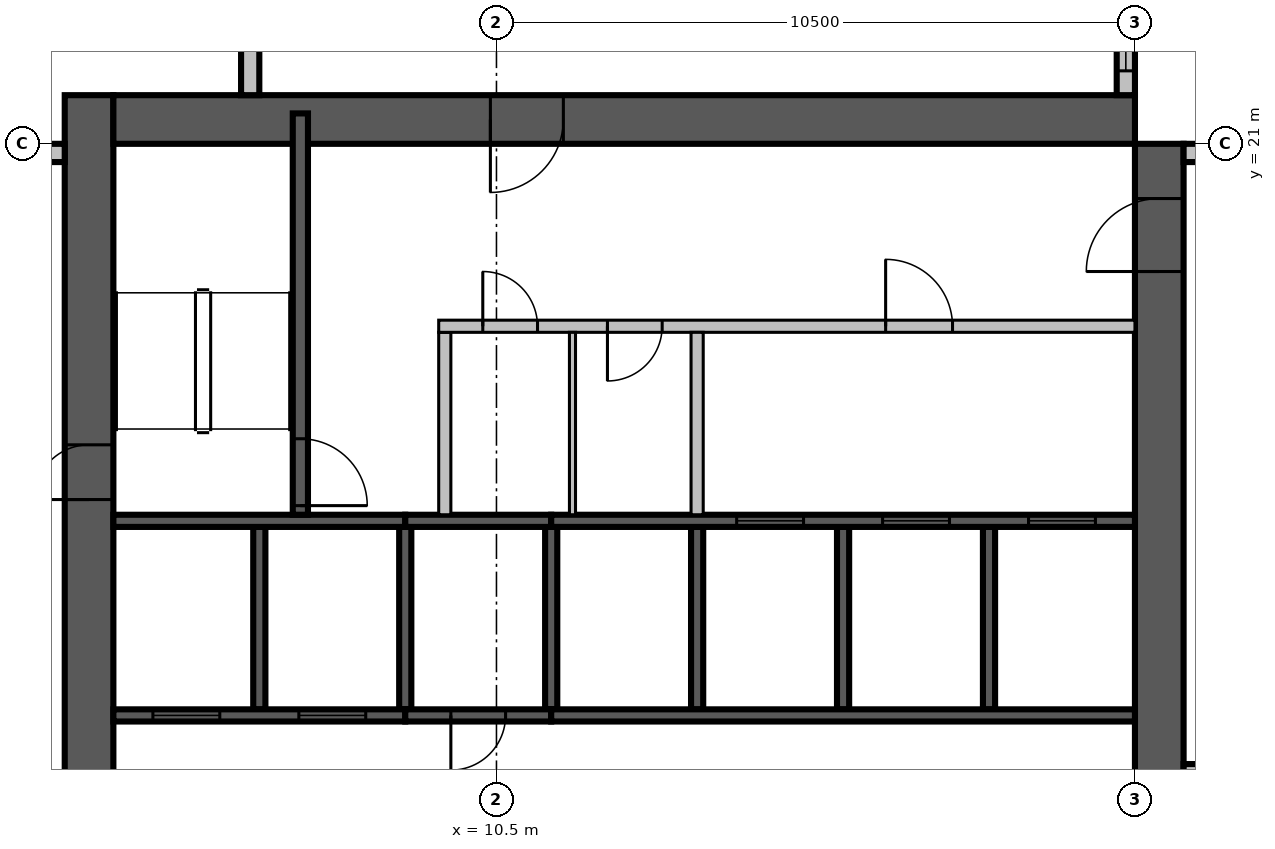
"""IFC4 building model, lengths in metres.
Left out: names, types, materials, properties, quantities, classifications, styles, units other than length and angle.
Written with IfcOpenShell. Run it as: python <this file> out.ifc"""

import sys

from ifc_helpers import new_model, si_unit, direction, frame, frame_2d, origin, place, context, subcontext, project, spatial, rectangle, extrude, source, transform, mapped, element, fill, save


model = new_model("IFC4")
c1 = context("Model", 3, precision=1e-05, world=origin(), true_north=direction((0.0, 1.0)))
c2 = subcontext(c1, "Body", "Model", "MODEL_VIEW")
j1 = project(units=[si_unit("LENGTHUNIT", "METRE"), si_unit("PLANEANGLEUNIT", "RADIAN")], contexts=[c1])
p1 = place(None, origin())
s1 = spatial("IfcSite", under=j1, at=p1, CompositionType="ELEMENT")
p2 = place(p1, origin())
s2 = spatial("IfcBuilding", under=s1, at=p2, CompositionType="ELEMENT")
p3 = place(p2, frame((0.0, 0.0, 257.6)))
s3 = spatial("IfcBuildingStorey", under=s2, at=p3, CompositionType="ELEMENT", Elevation=257.6)
m1 = source(origin(), c2, "Body", "SweptSolid", [
    extrude(rectangle(XDim=17.6, YDim=0.8, at=frame_2d((8.8, 0.0))), origin(), (0.0, 0.0, 1.0), 3.8),
])
p4 = place(p3, frame((3.8, 4.2, 0.0), z_axis=(0.0, 0.0, 1.0), x_axis=(0.0, 1.0, 0.0)))
e1 = element("IfcWall", 1, at=p4, inside=s3, PredefinedType="SHEAR", context=c2, shape_type="MappedRepresentation", body=[
    mapped(m1, transform((0.0, 0.0, 0.0), scale=1.0)),
])
m2 = source(origin(), c2, "Body", "SweptSolid", [
    extrude(rectangle(XDim=2.2, YDim=2.1, at=frame_2d((1.1, 1.05))), frame((0.0, 0.41, 0.0), z_axis=(0.0, -1.0, 0.0), x_axis=(1.0, 0.0, 0.0)), (0.0, 0.0, 1.0), 0.82),
])
p5 = place(p4, frame((4.2, 0.0, 0.0)))
e2 = element("IfcOpeningElement", 2, at=p5, cuts=e1, PredefinedType="OPENING", context=c2, shape_type="MappedRepresentation", body=[
    mapped(m2, transform((0.0, 0.0, 0.0), scale=1.0)),
])
m3 = source(origin(), c2, "Body", "SweptSolid", [
    extrude(rectangle(XDim=0.9, YDim=2.1, at=frame_2d((0.45, 1.05))), frame((0.0, 0.41, 0.0), z_axis=(0.0, -1.0, 0.0), x_axis=(1.0, 0.0, 0.0)), (0.0, 0.0, 1.0), 0.82),
])
p6 = place(p4, frame((10.95, 0.0, 0.0)))
e3 = element("IfcOpeningElement", 3, at=p6, cuts=e1, PredefinedType="OPENING", context=c2, shape_type="MappedRepresentation", body=[
    mapped(m3, transform((0.0, 0.0, 0.0), scale=1.0)),
])
m4 = source(origin(), c2, "Body", "SweptSolid", [
    extrude(rectangle(XDim=16.8, YDim=0.8, at=frame_2d((8.4, 0.0))), origin(), (0.0, 0.0, 1.0), 3.8),
])
p7 = place(p3, frame((21.4, 4.2, 0.0), z_axis=(0.0, 0.0, 1.0), x_axis=(0.0, 1.0, 0.0)))
e4 = element("IfcWall", 4, at=p7, inside=s3, PredefinedType="SHEAR", context=c2, shape_type="MappedRepresentation", body=[
    mapped(m4, transform((0.0, 0.0, 0.0), scale=1.0)),
])
m5 = source(origin(), c2, "Body", "SweptSolid", [
    extrude(rectangle(XDim=1.2, YDim=2.1, at=frame_2d((0.6, 1.05))), frame((0.0, 0.41, 0.0), z_axis=(0.0, -1.0, 0.0), x_axis=(1.0, 0.0, 0.0)), (0.0, 0.0, 1.0), 0.82),
])
p8 = place(p7, frame((14.7, 0.0, 0.0)))
e5 = element("IfcOpeningElement", 5, at=p8, cuts=e4, PredefinedType="OPENING", context=c2, shape_type="MappedRepresentation", body=[
    mapped(m5, transform((0.0, 0.0, 0.0), scale=1.0)),
])
p9 = place(p3, frame((4.2, 21.4, 0.0), z_axis=(0.0, 0.0, 1.0), x_axis=(1.0, 0.0, 0.0)))
e6 = element("IfcWall", 6, at=p9, inside=s3, PredefinedType="SHEAR", context=c2, shape_type="MappedRepresentation", body=[
    mapped(m4, transform((0.0, 0.0, 0.0), scale=1.0)),
])
p10 = place(p9, frame((6.2, 0.0, 0.0)))
e7 = element("IfcOpeningElement", 7, at=p10, cuts=e6, PredefinedType="OPENING", context=c2, shape_type="MappedRepresentation", body=[
    mapped(m5, transform((0.0, 0.0, 0.0), scale=1.0)),
])
m6 = source(origin(), c2, "Body", "SweptSolid", [
    extrude(rectangle(XDim=7.2, YDim=0.3, at=frame_2d((3.6, 0.0))), origin(), (0.0, 0.0, 1.0), 3.4),
])
p11 = place(p3, frame((21.8, 10.65, 0.0), z_axis=(0.0, 0.0, 1.0), x_axis=(1.0, 0.0, 0.0)))
e8 = element("IfcWall", 8, at=p11, inside=s3, PredefinedType="STANDARD", context=c2, shape_type="MappedRepresentation", body=[
    mapped(m6, transform((0.0, 0.0, 0.0), scale=1.0)),
])
m7 = source(origin(), c2, "Body", "SweptSolid", [
    extrude(rectangle(XDim=1.8, YDim=2.3, at=frame_2d((0.9, 1.15))), frame((0.0, 0.16, 0.0), z_axis=(0.0, -1.0, 0.0), x_axis=(1.0, 0.0, 0.0)), (0.0, 0.0, 1.0), 0.32),
])
p12 = place(p11, frame((0.4, 0.0, 0.6)))
e9 = element("IfcOpeningElement", 9, at=p12, cuts=e8, PredefinedType="OPENING", context=c2, shape_type="MappedRepresentation", body=[
    mapped(m7, transform((0.0, 0.0, 0.0), scale=1.0)),
])
p13 = place(p11, frame((4.787, 0.0, 0.6)))
e10 = element("IfcOpeningElement", 10, at=p13, cuts=e8, PredefinedType="OPENING", context=c2, shape_type="MappedRepresentation", body=[
    mapped(m7, transform((0.0, 0.0, 0.0), scale=1.0)),
])
p14 = place(p3, frame((29.0, 20.85, 0.0), z_axis=(0.0, 0.0, 1.0), x_axis=(-1.0, 0.0, 0.0)))
e11 = element("IfcWall", 11, at=p14, inside=s3, PredefinedType="STANDARD", context=c2, shape_type="MappedRepresentation", body=[
    mapped(m6, transform((0.0, 0.0, 0.0), scale=1.0)),
])
p15 = place(p14, frame((0.613, 0.0, 0.6)))
e12 = element("IfcOpeningElement", 12, at=p15, cuts=e11, PredefinedType="OPENING", context=c2, shape_type="MappedRepresentation", body=[
    mapped(m7, transform((0.0, 0.0, 0.0), scale=1.0)),
])
p16 = place(p14, frame((5.0, 0.0, 0.6)))
e13 = element("IfcOpeningElement", 13, at=p16, cuts=e11, PredefinedType="OPENING", context=c2, shape_type="MappedRepresentation", body=[
    mapped(m7, transform((0.0, 0.0, 0.0), scale=1.0)),
])
p17 = place(p3, frame((20.85, 21.8, 0.0), z_axis=(0.0, 0.0, 1.0), x_axis=(0.0, 1.0, 0.0)))
e14 = element("IfcWall", 14, at=p17, inside=s3, PredefinedType="STANDARD", context=c2, shape_type="MappedRepresentation", body=[
    mapped(m6, transform((0.0, 0.0, 0.0), scale=1.0)),
])
p18 = place(p17, frame((0.4, 0.0, 0.6)))
e15 = element("IfcOpeningElement", 15, at=p18, cuts=e14, PredefinedType="OPENING", context=c2, shape_type="MappedRepresentation", body=[
    mapped(m7, transform((0.0, 0.0, 0.0), scale=1.0)),
])
m8 = source(origin(), c2, "Body", "SweptSolid", [
    extrude(rectangle(XDim=1.0, YDim=2.1, at=frame_2d((0.5, 1.05))), frame((0.0, 0.16, 0.0), z_axis=(0.0, -1.0, 0.0), x_axis=(1.0, 0.0, 0.0)), (0.0, 0.0, 1.0), 0.32),
])
p19 = place(p17, frame((5.292, 0.0, 0.0)))
e16 = element("IfcOpeningElement", 16, at=p19, cuts=e14, PredefinedType="OPENING", context=c2, shape_type="MappedRepresentation", body=[
    mapped(m8, transform((0.0, 0.0, 0.0), scale=1.0)),
])
m9 = source(origin(), c2, "Body", "SweptSolid", [
    extrude(rectangle(XDim=16.6, YDim=0.3, at=frame_2d((8.3, 0.0))), origin(), (0.0, 0.0, 1.0), 3.4),
])
p20 = place(p3, frame((6.45, 38.4, 0.0), z_axis=(0.0, 0.0, 1.0), x_axis=(0.0, -1.0, 0.0)))
e17 = element("IfcWall", 17, at=p20, inside=s3, PredefinedType="STANDARD", context=c2, shape_type="MappedRepresentation", body=[
    mapped(m9, transform((0.0, 0.0, 0.0), scale=1.0)),
])
p21 = place(p20, frame((1.15, 0.0, 0.6)))
e18 = element("IfcOpeningElement", 18, at=p21, cuts=e17, PredefinedType="OPENING", context=c2, shape_type="MappedRepresentation", body=[
    mapped(m7, transform((0.0, 0.0, 0.0), scale=1.0)),
])
p22 = place(p20, frame((9.438, 0.0, 0.6)))
e19 = element("IfcOpeningElement", 19, at=p22, cuts=e17, PredefinedType="OPENING", context=c2, shape_type="MappedRepresentation", body=[
    mapped(m7, transform((0.0, 0.0, 0.0), scale=1.0)),
])
m10 = source(origin(), c2, "Body", "SweptSolid", [
    extrude(rectangle(XDim=3.0, YDim=2.3, at=frame_2d((1.5, 1.15))), frame((0.0, 0.16, 0.0), z_axis=(0.0, -1.0, 0.0), x_axis=(1.0, 0.0, 0.0)), (0.0, 0.0, 1.0), 0.32),
])
p23 = place(p20, frame((12.7, 0.0, 0.6)))
e20 = element("IfcOpeningElement", 20, at=p23, cuts=e17, PredefinedType="OPENING", context=c2, shape_type="MappedRepresentation", body=[
    mapped(m10, transform((0.0, 0.0, 0.0), scale=1.0)),
])
p24 = place(p20, frame((5.45, 0.0, 0.0)))
e21 = element("IfcOpeningElement", 21, at=p24, cuts=e17, PredefinedType="OPENING", context=c2, shape_type="MappedRepresentation", body=[
    mapped(m8, transform((0.0, 0.0, 0.0), scale=1.0)),
])
m11 = source(origin(), c2, "Body", "SweptSolid", [
    extrude(rectangle(XDim=2.6, YDim=0.3, at=frame_2d((1.3, 0.0))), origin(), (0.0, 0.0, 1.0), 3.4),
])
p25 = place(p3, frame((3.4, 20.85, 0.0), z_axis=(0.0, 0.0, 1.0), x_axis=(-1.0, 0.0, 0.0)))
e22 = element("IfcWall", 22, at=p25, inside=s3, PredefinedType="STANDARD", context=c2, shape_type="MappedRepresentation", body=[
    mapped(m11, transform((0.0, 0.0, 0.0), scale=1.0)),
])
p26 = place(p25, frame((0.4, 0.0, 0.6)))
e23 = element("IfcOpeningElement", 23, at=p26, cuts=e22, PredefinedType="OPENING", context=c2, shape_type="MappedRepresentation", body=[
    mapped(m7, transform((0.0, 0.0, 0.0), scale=1.0)),
])
m12 = source(origin(), c2, "Body", "SweptSolid", [
    extrude(rectangle(XDim=3.0, YDim=0.2, at=frame_2d((1.5, 0.0))), origin(), (0.0, 0.0, 1.0), 3.8),
])
p27 = place(p3, frame((6.6, 11.7, 0.0), z_axis=(0.0, 0.0, 1.0), x_axis=(0.0, 1.0, 0.0)))
e24 = element("IfcWall", 24, at=p27, inside=s3, PredefinedType="SOLIDWALL", context=c2, shape_type="MappedRepresentation", body=[
    mapped(m12, transform((0.0, 0.0, 0.0), scale=1.0)),
])
m13 = source(origin(), c2, "Body", "SweptSolid", [
    extrude(rectangle(XDim=3.0, YDim=0.2, at=frame_2d((1.5, 0.0))), origin(), (0.0, 0.0, 1.0), 3.4),
])
for number, where, z_axis, x_axis in (
    (25, (9.0, 11.7, 0.0), (0.0, 0.0, 1.0), (0.0, 1.0, 0.0)),
    (26, (11.4, 11.7, 0.0), (0.0, 0.0, 1.0), (0.0, 1.0, 0.0)),
):
    element("IfcWall", number, at=place(p3, frame(where, z_axis=z_axis, x_axis=x_axis)), inside=s3, PredefinedType="SOLIDWALL", context=c2, shape_type="MappedRepresentation", body=[
        mapped(m13, transform((0.0, 0.0, 0.0), scale=1.0)),
    ])
for number, where, z_axis, x_axis in (
    (27, (13.8, 11.7, 0.0), (0.0, 0.0, 1.0), (0.0, 1.0, 0.0)),
    (28, (16.2, 11.7, 0.0), (0.0, 0.0, 1.0), (0.0, 1.0, 0.0)),
    (29, (18.6, 11.7, 0.0), (0.0, 0.0, 1.0), (0.0, 1.0, 0.0)),
):
    element("IfcWall", number, at=place(p3, frame(where, z_axis=z_axis, x_axis=x_axis)), inside=s3, PredefinedType="SOLIDWALL", context=c2, shape_type="MappedRepresentation", body=[
        mapped(m12, transform((0.0, 0.0, 0.0), scale=1.0)),
    ])
m14 = source(origin(), c2, "Body", "SweptSolid", [
    extrude(rectangle(XDim=4.8, YDim=0.2, at=frame_2d((2.4, 0.0))), origin(), (0.0, 0.0, 1.0), 3.8),
])
p28 = place(p3, frame((4.2, 11.6, 0.0), z_axis=(0.0, 0.0, 1.0), x_axis=(1.0, 0.0, 0.0)))
e30 = element("IfcWall", 30, at=p28, inside=s3, PredefinedType="SOLIDWALL", context=c2, shape_type="MappedRepresentation", body=[
    mapped(m14, transform((0.0, 0.0, 0.0), scale=1.0)),
])
m15 = source(origin(), c2, "Body", "SweptSolid", [
    extrude(rectangle(XDim=1.1, YDim=2.1, at=frame_2d((0.55, 1.05))), frame((0.0, 0.11, 0.0), z_axis=(0.0, -1.0, 0.0), x_axis=(1.0, 0.0, 0.0)), (0.0, 0.0, 1.0), 0.22),
])
p29 = place(p28, frame((0.65, 0.0, 0.0)))
e31 = element("IfcOpeningElement", 31, at=p29, cuts=e30, PredefinedType="OPENING", context=c2, shape_type="MappedRepresentation", body=[
    mapped(m15, transform((0.0, 0.0, 0.0), scale=1.0)),
])
p30 = place(p28, frame((3.05, 0.0, 0.0)))
e32 = element("IfcOpeningElement", 32, at=p30, cuts=e30, PredefinedType="OPENING", context=c2, shape_type="MappedRepresentation", body=[
    mapped(m15, transform((0.0, 0.0, 0.0), scale=1.0)),
])
m16 = source(origin(), c2, "Body", "SweptSolid", [
    extrude(rectangle(XDim=2.4, YDim=0.2, at=frame_2d((1.2, 0.0))), origin(), (0.0, 0.0, 1.0), 3.4),
])
p31 = place(p3, frame((9.0, 11.6, 0.0), z_axis=(0.0, 0.0, 1.0), x_axis=(1.0, 0.0, 0.0)))
e33 = element("IfcWall", 33, at=p31, inside=s3, PredefinedType="SOLIDWALL", context=c2, shape_type="MappedRepresentation", body=[
    mapped(m16, transform((0.0, 0.0, 0.0), scale=1.0)),
])
m17 = source(origin(), c2, "Body", "SweptSolid", [
    extrude(rectangle(XDim=0.9, YDim=2.1, at=frame_2d((0.45, 1.05))), frame((0.0, 0.11, 0.0), z_axis=(0.0, -1.0, 0.0), x_axis=(1.0, 0.0, 0.0)), (0.0, 0.0, 1.0), 0.22),
])
p32 = place(p31, frame((0.75, 0.0, 0.0)))
e34 = element("IfcOpeningElement", 34, at=p32, cuts=e33, PredefinedType="OPENING", context=c2, shape_type="MappedRepresentation", body=[
    mapped(m17, transform((0.0, 0.0, 0.0), scale=1.0)),
])
m18 = source(origin(), c2, "Body", "SweptSolid", [
    extrude(rectangle(XDim=9.6, YDim=0.2, at=frame_2d((4.8, 0.0))), origin(), (0.0, 0.0, 1.0), 3.8),
])
p33 = place(p3, frame((11.4, 11.6, 0.0), z_axis=(0.0, 0.0, 1.0), x_axis=(1.0, 0.0, 0.0)))
e35 = element("IfcWall", 35, at=p33, inside=s3, PredefinedType="SOLIDWALL", context=c2, shape_type="MappedRepresentation", body=[
    mapped(m18, transform((0.0, 0.0, 0.0), scale=1.0)),
])
p34 = place(p3, frame((4.2, 14.8, 0.0), z_axis=(0.0, 0.0, 1.0), x_axis=(1.0, 0.0, 0.0)))
e36 = element("IfcWall", 36, at=p34, inside=s3, PredefinedType="SOLIDWALL", context=c2, shape_type="MappedRepresentation", body=[
    mapped(m14, transform((0.0, 0.0, 0.0), scale=1.0)),
])
p35 = place(p3, frame((9.0, 14.8, 0.0), z_axis=(0.0, 0.0, 1.0), x_axis=(1.0, 0.0, 0.0)))
e37 = element("IfcWall", 37, at=p35, inside=s3, PredefinedType="SOLIDWALL", context=c2, shape_type="MappedRepresentation", body=[
    mapped(m16, transform((0.0, 0.0, 0.0), scale=1.0)),
])
p36 = place(p3, frame((11.4, 14.8, 0.0), z_axis=(0.0, 0.0, 1.0), x_axis=(1.0, 0.0, 0.0)))
e38 = element("IfcWall", 38, at=p36, inside=s3, PredefinedType="SOLIDWALL", context=c2, shape_type="MappedRepresentation", body=[
    mapped(m18, transform((0.0, 0.0, 0.0), scale=1.0)),
])
p37 = place(p36, frame((3.05, 0.0, 0.0)))
e39 = element("IfcOpeningElement", 39, at=p37, cuts=e38, PredefinedType="OPENING", context=c2, shape_type="MappedRepresentation", body=[
    mapped(m15, transform((0.0, 0.0, 0.0), scale=1.0)),
])
p38 = place(p36, frame((5.45, 0.0, 0.0)))
e40 = element("IfcOpeningElement", 40, at=p38, cuts=e38, PredefinedType="OPENING", context=c2, shape_type="MappedRepresentation", body=[
    mapped(m15, transform((0.0, 0.0, 0.0), scale=1.0)),
])
p39 = place(p36, frame((7.85, 0.0, 0.0)))
e41 = element("IfcOpeningElement", 41, at=p39, cuts=e38, PredefinedType="OPENING", context=c2, shape_type="MappedRepresentation", body=[
    mapped(m15, transform((0.0, 0.0, 0.0), scale=1.0)),
])
m19 = source(origin(), c2, "Body", "SweptSolid", [
    extrude(rectangle(XDim=6.6, YDim=0.25, at=frame_2d((3.3, 0.0))), origin(), (0.0, 0.0, 1.0), 3.4),
])
p40 = place(p3, frame((7.275, 14.9, 0.0), z_axis=(0.0, 0.0, 1.0), x_axis=(0.0, 1.0, 0.0)))
e42 = element("IfcWall", 42, at=p40, inside=s3, PredefinedType="SOLIDWALL", context=c2, shape_type="MappedRepresentation", body=[
    mapped(m19, transform((0.0, 0.0, 0.0), scale=1.0)),
])
m20 = source(origin(), c2, "Body", "SweptSolid", [
    extrude(rectangle(XDim=1.1, YDim=2.1, at=frame_2d((0.55, 1.05))), frame((0.0, 0.135, 0.0), z_axis=(0.0, -1.0, 0.0), x_axis=(1.0, 0.0, 0.0)), (0.0, 0.0, 1.0), 0.27),
])
p41 = place(p40, frame((0.15, 0.0, 0.0)))
e43 = element("IfcOpeningElement", 43, at=p41, cuts=e42, PredefinedType="OPENING", context=c2, shape_type="MappedRepresentation", body=[
    mapped(m20, transform((0.0, 0.0, 0.0), scale=1.0)),
])
m21 = source(origin(), c2, "Body", "SweptSolid", [
    extrude(rectangle(XDim=3.0, YDim=0.2, at=frame_2d((1.5, 0.0))), origin(), (0.0, 0.0, 1.0), 3.4),
])
p42 = place(p3, frame((9.65, 14.9, 0.0), z_axis=(0.0, 0.0, 1.0), x_axis=(0.0, 1.0, 0.0)))
e44 = element("IfcWall", 44, at=p42, inside=s3, PredefinedType="PARTITIONING", context=c2, shape_type="MappedRepresentation", body=[
    mapped(m21, transform((0.0, 0.0, 0.0), scale=1.0)),
])
m22 = source(origin(), c2, "Body", "SweptSolid", [
    extrude(rectangle(XDim=11.45, YDim=0.2, at=frame_2d((5.725, 0.0))), origin(), (0.0, 0.0, 1.0), 3.4),
])
p43 = place(p3, frame((9.55, 18.0, 0.0), z_axis=(0.0, 0.0, 1.0), x_axis=(1.0, 0.0, 0.0)))
e45 = element("IfcWall", 45, at=p43, inside=s3, PredefinedType="PARTITIONING", context=c2, shape_type="MappedRepresentation", body=[
    mapped(m22, transform((0.0, 0.0, 0.0), scale=1.0)),
])
p44 = place(p43, frame((0.725, 0.0, 0.0)))
e46 = element("IfcOpeningElement", 46, at=p44, cuts=e45, PredefinedType="OPENING", context=c2, shape_type="MappedRepresentation", body=[
    mapped(m17, transform((0.0, 0.0, 0.0), scale=1.0)),
])
p45 = place(p43, frame((2.775, 0.0, 0.0)))
e47 = element("IfcOpeningElement", 47, at=p45, cuts=e45, PredefinedType="OPENING", context=c2, shape_type="MappedRepresentation", body=[
    mapped(m17, transform((0.0, 0.0, 0.0), scale=1.0)),
])
p46 = place(p43, frame((7.35, 0.0, 0.0)))
e48 = element("IfcOpeningElement", 48, at=p46, cuts=e45, PredefinedType="OPENING", context=c2, shape_type="MappedRepresentation", body=[
    mapped(m15, transform((0.0, 0.0, 0.0), scale=1.0)),
])
p47 = place(p3, frame((13.8, 14.9, 0.0), z_axis=(0.0, 0.0, 1.0), x_axis=(0.0, 1.0, 0.0)))
e49 = element("IfcWall", 49, at=p47, inside=s3, PredefinedType="PARTITIONING", context=c2, shape_type="MappedRepresentation", body=[
    mapped(m21, transform((0.0, 0.0, 0.0), scale=1.0)),
])
m23 = source(origin(), c2, "Body", "SweptSolid", [
    extrude(rectangle(XDim=3.0, YDim=0.1, at=frame_2d((1.5, 0.0))), origin(), (0.0, 0.0, 1.0), 3.4),
])
p48 = place(p3, frame((11.75, 14.9, 0.0), z_axis=(0.0, 0.0, 1.0), x_axis=(0.0, 1.0, 0.0)))
e50 = element("IfcWall", 50, at=p48, inside=s3, PredefinedType="PARTITIONING", context=c2, shape_type="MappedRepresentation", body=[
    mapped(m23, transform((0.0, 0.0, 0.0), scale=1.0)),
])
m24 = source(origin(), c2, "Body", "SweptSolid", [
    extrude(rectangle(XDim=1.8, YDim=2.3, at=frame_2d((0.9, 1.15))), frame((0.0, 0.03, 0.0), z_axis=(0.0, -1.0, 0.0), x_axis=(1.0, 0.0, 0.0)), (0.0, 0.0, 1.0), 0.06),
])
p49 = place(p18, origin())
e51 = element("IfcWindow", 51, at=p49, inside=s3, PartitioningType="SINGLE_PANEL", PredefinedType="WINDOW", context=c2, shape_type="MappedRepresentation", body=[
    mapped(m24, transform((0.0, 0.0, 0.0), scale=1.0)),
])
fill(e15, e51)
m25 = source(origin(), c2, "Body", "SweptSolid", [
    extrude(rectangle(XDim=1.1, YDim=2.1, at=frame_2d((0.55, 1.05))), frame((0.0, 0.025, 0.0), z_axis=(0.0, -1.0, 0.0), x_axis=(1.0, 0.0, 0.0)), (0.0, 0.0, 1.0), 0.05),
])
p50 = place(p29, origin())
e52 = element("IfcDoor", 52, at=p50, inside=s3, OperationType="SLIDING_TO_LEFT", PredefinedType="DOOR", context=c2, shape_type="MappedRepresentation", body=[
    mapped(m25, transform((0.0, 0.0, 0.0), scale=1.0)),
])
fill(e31, e52)
p51 = place(p30, origin())
e53 = element("IfcDoor", 53, at=p51, inside=s3, OperationType="SLIDING_TO_LEFT", PredefinedType="DOOR", context=c2, shape_type="MappedRepresentation", body=[
    mapped(m25, transform((0.0, 0.0, 0.0), scale=1.0)),
])
fill(e32, e53)
m26 = source(origin(), c2, "Body", "SweptSolid", [
    extrude(rectangle(XDim=0.9, YDim=2.1, at=frame_2d((0.45, 1.05))), frame((0.0, 0.025, 0.0), z_axis=(0.0, -1.0, 0.0), x_axis=(1.0, 0.0, 0.0)), (0.0, 0.0, 1.0), 0.05),
])
p52 = place(p32, origin())
e54 = element("IfcDoor", 54, at=p52, inside=s3, OperationType="SINGLE_SWING_RIGHT", PredefinedType="DOOR", context=c2, shape_type="MappedRepresentation", body=[
    mapped(m26, transform((0.0, 0.0, 0.0), scale=1.0)),
])
fill(e34, e54)
p53 = place(p37, origin())
e55 = element("IfcDoor", 55, at=p53, inside=s3, OperationType="SLIDING_TO_LEFT", PredefinedType="DOOR", context=c2, shape_type="MappedRepresentation", body=[
    mapped(m25, transform((0.0, 0.0, 0.0), scale=1.0)),
])
fill(e39, e55)
p54 = place(p38, origin())
e56 = element("IfcDoor", 56, at=p54, inside=s3, OperationType="SLIDING_TO_LEFT", PredefinedType="DOOR", context=c2, shape_type="MappedRepresentation", body=[
    mapped(m25, transform((0.0, 0.0, 0.0), scale=1.0)),
])
fill(e40, e56)
p55 = place(p39, origin())
e57 = element("IfcDoor", 57, at=p55, inside=s3, OperationType="SLIDING_TO_LEFT", PredefinedType="DOOR", context=c2, shape_type="MappedRepresentation", body=[
    mapped(m25, transform((0.0, 0.0, 0.0), scale=1.0)),
])
fill(e41, e57)
p56 = place(p41, origin())
e58 = element("IfcDoor", 58, at=p56, inside=s3, OperationType="SINGLE_SWING_RIGHT", PredefinedType="DOOR", context=c2, shape_type="MappedRepresentation", body=[
    mapped(m25, transform((0.0, 0.0, 0.0), scale=1.0)),
])
fill(e43, e58)
p57 = place(p44, origin())
e59 = element("IfcDoor", 59, at=p57, inside=s3, OperationType="SINGLE_SWING_LEFT", PredefinedType="DOOR", context=c2, shape_type="MappedRepresentation", body=[
    mapped(m26, transform((0.0, 0.0, 0.0), scale=1.0)),
])
fill(e46, e59)
p58 = place(p45, origin())
e60 = element("IfcDoor", 60, at=p58, inside=s3, OperationType="SINGLE_SWING_RIGHT", PredefinedType="DOOR", context=c2, shape_type="MappedRepresentation", body=[
    mapped(m26, transform((0.0, 0.0, 0.0), scale=1.0)),
])
fill(e47, e60)
p59 = place(p46, origin())
e61 = element("IfcDoor", 61, at=p59, inside=s3, OperationType="SINGLE_SWING_LEFT", PredefinedType="DOOR", context=c2, shape_type="MappedRepresentation", body=[
    mapped(m25, transform((0.0, 0.0, 0.0), scale=1.0)),
])
fill(e48, e61)
m27 = source(origin(), c2, "Body", "SweptSolid", [
    extrude(rectangle(XDim=1.2, YDim=2.1, at=frame_2d((0.6, 1.05))), frame((0.0, 0.025, 0.0), z_axis=(0.0, -1.0, 0.0), x_axis=(1.0, 0.0, 0.0)), (0.0, 0.0, 1.0), 0.05),
])
p60 = place(p10, origin())
e62 = element("IfcDoor", 62, at=p60, inside=s3, OperationType="SINGLE_SWING_RIGHT", PredefinedType="DOOR", context=c2, shape_type="MappedRepresentation", body=[
    mapped(m27, transform((0.0, 0.0, 0.0), scale=1.0)),
])
fill(e7, e62)
p61 = place(p8, origin())
e63 = element("IfcDoor", 63, at=p61, inside=s3, OperationType="SINGLE_SWING_LEFT", PredefinedType="DOOR", context=c2, shape_type="MappedRepresentation", body=[
    mapped(m27, transform((0.0, 0.0, 0.0), scale=1.0)),
])
fill(e5, e63)
p62 = place(p6, origin())
e64 = element("IfcDoor", 64, at=p62, inside=s3, OperationType="SINGLE_SWING_LEFT", PredefinedType="DOOR", context=c2, shape_type="MappedRepresentation", body=[
    mapped(m26, transform((0.0, 0.0, 0.0), scale=1.0)),
])
fill(e3, e64)
save(model, sys.argv[1])
